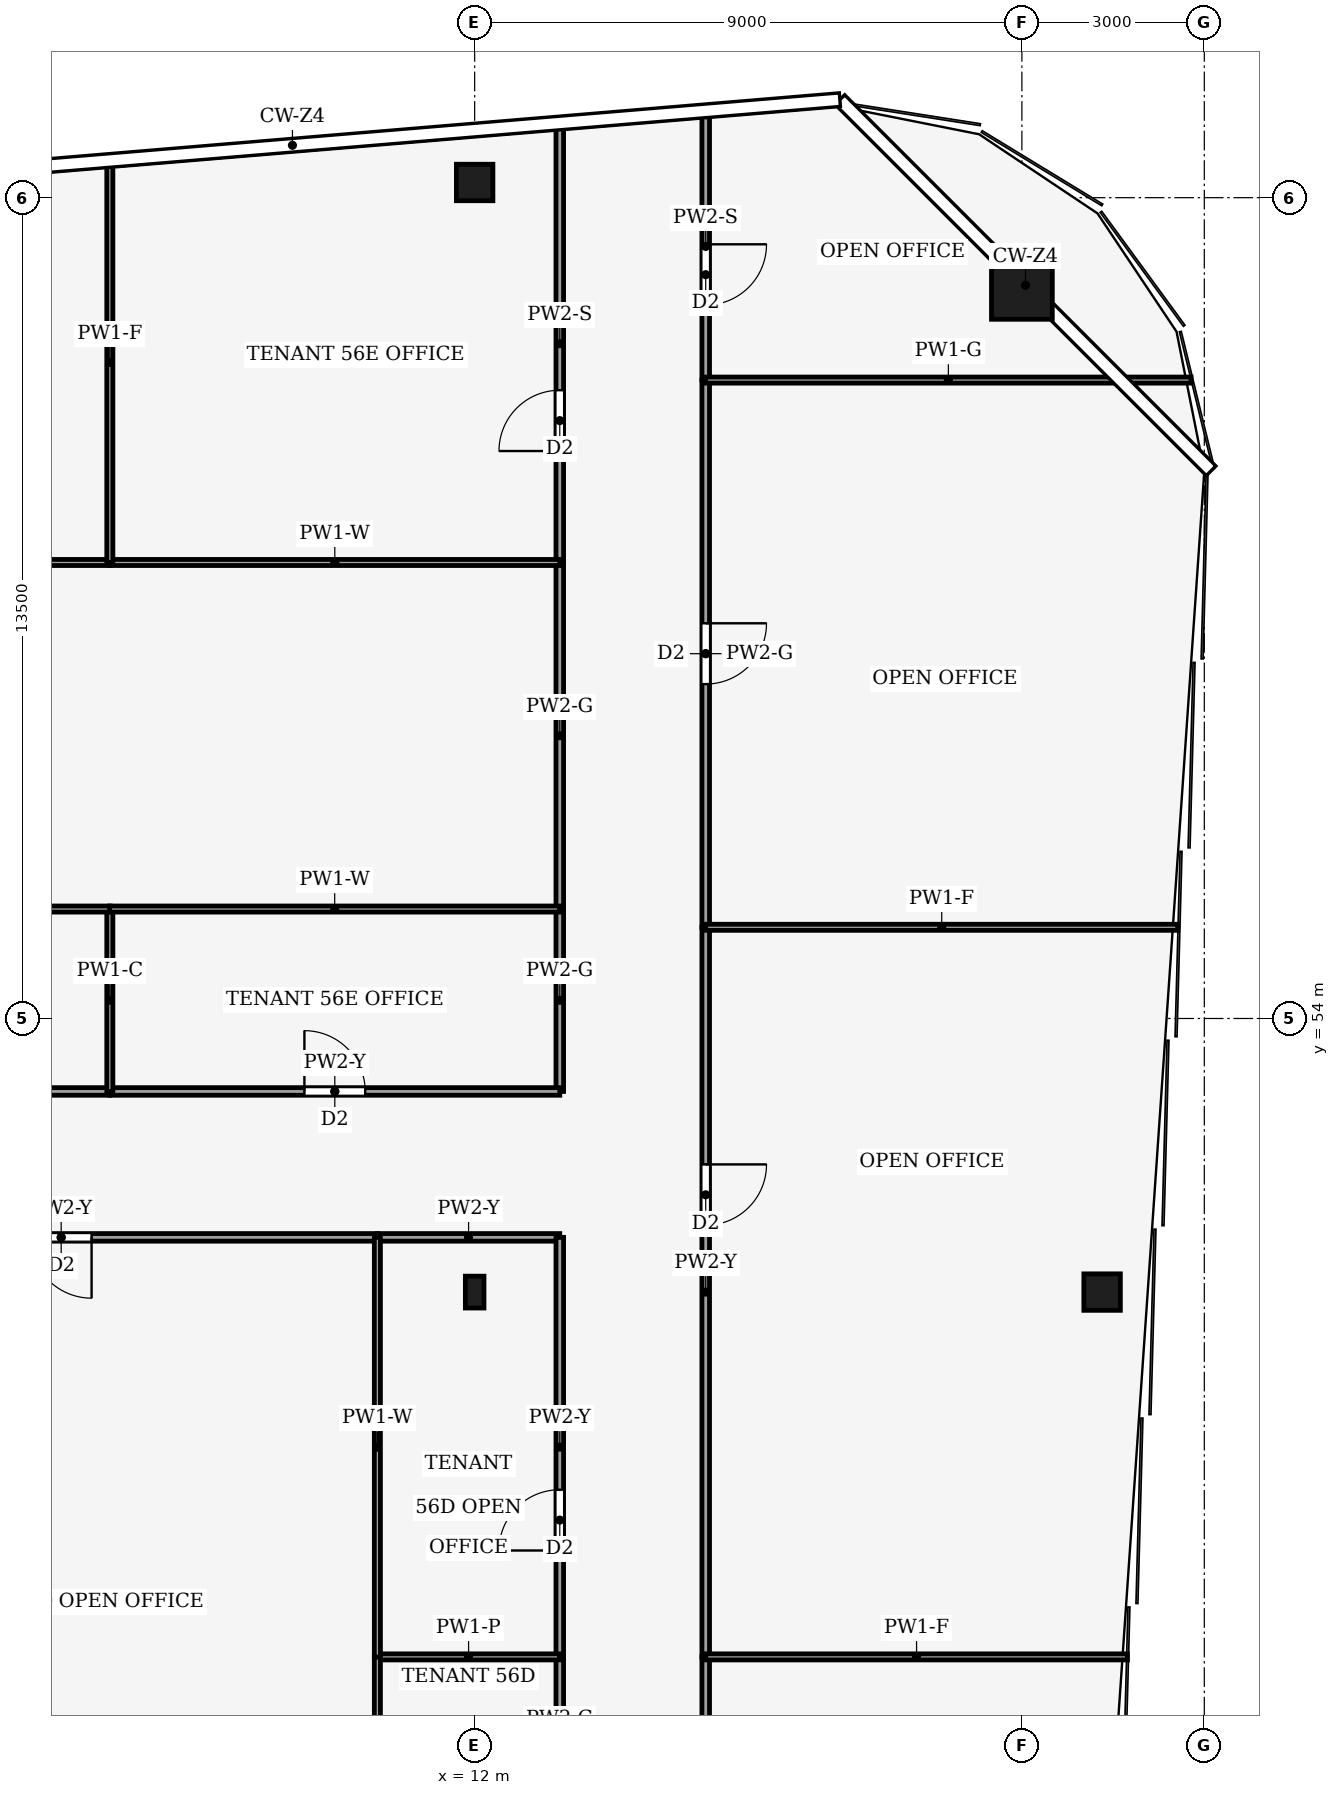
"""IFC4 building model, lengths in metres.
Left out: names, types, materials, properties, quantities, classifications, styles, units other than length and angle.
Written with IfcOpenShell. Run it as: python <this file> out.ifc"""

import sys

from ifc_helpers import new_model, si_unit, direction, frame, frame_2d, origin, origin_2d, place, context, subcontext, project, spatial, rectangle, hollow_rectangle, i_section, extrude, element, fill, save


model = new_model("IFC4")
c1 = context("Model", 3, precision=1e-05, world=origin(), true_north=direction((0.0, 1.0)))
c2 = subcontext(c1, "Body", "Model", "MODEL_VIEW")
j1 = project(units=[si_unit("LENGTHUNIT", "METRE"), si_unit("PLANEANGLEUNIT", "RADIAN")], contexts=[c1])
p1 = place(None, origin())
s1 = spatial("IfcSite", under=j1, at=p1, CompositionType="ELEMENT")
p2 = place(p1, origin())
s2 = spatial("IfcBuilding", under=s1, at=p2, CompositionType="ELEMENT")
p3 = place(p2, frame((0.0, 0.0, 246.0)))
s3 = spatial("IfcBuildingStorey", under=s2, at=p3, CompositionType="ELEMENT", Elevation=246.0)
p4 = place(p3, frame((21.0, 66.0, 0.0), z_axis=(0.0, 0.0, 1.0), x_axis=(1.0, 0.0, 0.0)))
e1 = element("IfcColumn", 1, at=p4, inside=s3, PredefinedType="COLUMN", context=c2, shape_type="SweptSolid", body=[
    extrude(hollow_rectangle(XDim=1.0, YDim=1.0, WallThickness=0.045, at=origin_2d()), origin(), (0.0, 0.0, 1.0), 4.0),
])
for number, where, z_axis, x_axis in (
    (2, (12.0, 67.75, 0.0), (0.0, 0.0, 1.0), (1.0, 0.0, 0.0)),
    (3, (22.319, 49.5, 0.0), (0.0, 0.0, 1.0), (1.0, 0.0, 0.0)),
):
    element("IfcColumn", number, at=place(p3, frame(where, z_axis=z_axis, x_axis=x_axis)), inside=s3, PredefinedType="COLUMN", context=c2, shape_type="SweptSolid", body=[
        extrude(hollow_rectangle(XDim=0.6, YDim=0.6, WallThickness=0.025, at=origin_2d()), origin(), (0.0, 0.0, 1.0), 4.0),
    ])
p5 = place(p3, frame((12.0, 49.5, 0.0), z_axis=(0.0, 0.0, 1.0), x_axis=(1.0, 0.0, 0.0)))
e4 = element("IfcColumn", 4, at=p5, inside=s3, PredefinedType="COLUMN", context=c2, shape_type="SweptSolid", body=[
    extrude(i_section(OverallWidth=0.306, OverallDepth=0.524, WebThickness=0.012, FlangeThickness=0.04, FilletRadius=0.027, at=origin_2d()), origin(), (0.0, 0.0, 1.0), 4.0),
])
p6 = place(p3, frame((15.8, 43.5, 0.0), z_axis=(0.0, 0.0, 1.0), x_axis=(0.0, -1.0, 0.0)))
e5 = element("IfcWall", 5, at=p6, inside=s3, PredefinedType="PARTITIONING", context=c2, shape_type="SweptSolid", body=[
    extrude(rectangle(XDim=9.0, YDim=0.125, at=frame_2d((4.5, 0.0))), origin(), (0.0, 0.0, 1.0), 3.14),
])
p7 = place(p6, frame((4.0, 0.0, 0.0)))
e6 = element("IfcOpeningElement", 6, at=p7, cuts=e5, PredefinedType="OPENING", context=c2, shape_type="SweptSolid", body=[
    extrude(rectangle(XDim=1.0, YDim=2.1, at=frame_2d((0.5, 1.05))), frame((0.0, 0.073, 0.0), z_axis=(0.0, -1.0, 0.0), x_axis=(1.0, 0.0, 0.0)), (0.0, 0.0, 1.0), 0.145),
])
p8 = place(p3, frame((15.8, 55.5, 0.0), z_axis=(0.0, 0.0, 1.0), x_axis=(0.0, -1.0, 0.0)))
e7 = element("IfcWall", 7, at=p8, inside=s3, PredefinedType="PARTITIONING", context=c2, shape_type="SweptSolid", body=[
    extrude(rectangle(XDim=12.0, YDim=0.125, at=frame_2d((6.0, 0.0))), origin(), (0.0, 0.0, 1.0), 3.24),
])
p9 = place(p8, frame((3.9, 0.0, 0.0)))
e8 = element("IfcOpeningElement", 8, at=p9, cuts=e7, PredefinedType="OPENING", context=c2, shape_type="SweptSolid", body=[
    extrude(rectangle(XDim=1.0, YDim=2.1, at=frame_2d((0.5, 1.05))), frame((0.0, 0.073, 0.0), z_axis=(0.0, -1.0, 0.0), x_axis=(1.0, 0.0, 0.0)), (0.0, 0.0, 1.0), 0.145),
])
p10 = place(p3, frame((15.8, 64.5, 0.0), z_axis=(0.0, 0.0, 1.0), x_axis=(0.0, -1.0, 0.0)))
e9 = element("IfcWall", 9, at=p10, inside=s3, PredefinedType="PARTITIONING", context=c2, shape_type="SweptSolid", body=[
    extrude(rectangle(XDim=9.0, YDim=0.125, at=frame_2d((4.5, 0.0))), origin(), (0.0, 0.0, 1.0), 3.87),
])
p11 = place(p10, frame((4.0, 0.0, 0.0)))
e10 = element("IfcOpeningElement", 10, at=p11, cuts=e9, PredefinedType="OPENING", context=c2, shape_type="SweptSolid", body=[
    extrude(rectangle(XDim=1.0, YDim=2.1, at=frame_2d((0.5, 1.05))), frame((0.0, 0.073, 0.0), z_axis=(0.0, -1.0, 0.0), x_axis=(1.0, 0.0, 0.0)), (0.0, 0.0, 1.0), 0.145),
])
p12 = place(p3, frame((15.8, 68.897, 0.0), z_axis=(0.0, 0.0, 1.0), x_axis=(0.0, -1.0, 0.0)))
e11 = element("IfcWall", 11, at=p12, inside=s3, PredefinedType="PARTITIONING", context=c2, shape_type="SweptSolid", body=[
    extrude(rectangle(XDim=4.397, YDim=0.125, at=frame_2d((2.198, 0.0))), origin(), (0.0, 0.0, 1.0), 3.04),
])
p13 = place(p12, frame((2.163, 0.0, 0.0)))
e12 = element("IfcOpeningElement", 12, at=p13, cuts=e11, PredefinedType="OPENING", context=c2, shape_type="SweptSolid", body=[
    extrude(rectangle(XDim=1.0, YDim=2.1, at=frame_2d((0.5, 1.05))), frame((0.0, 0.073, 0.0), z_axis=(0.0, -1.0, 0.0), x_axis=(1.0, 0.0, 0.0)), (0.0, 0.0, 1.0), 0.145),
])
p14 = place(p3, frame((13.4, 40.5, 0.0), z_axis=(0.0, 0.0, 1.0), x_axis=(0.0, 1.0, 0.0)))
e13 = element("IfcWall", 13, at=p14, inside=s3, PredefinedType="PARTITIONING", context=c2, shape_type="SweptSolid", body=[
    extrude(rectangle(XDim=3.0, YDim=0.125, at=frame_2d((1.5, 0.0))), origin(), (0.0, 0.0, 1.0), 3.87),
])
p15 = place(p3, frame((13.4, 50.4, 0.0), z_axis=(0.0, 0.0, 1.0), x_axis=(-1.0, 0.0, 0.0)))
e14 = element("IfcWall", 14, at=p15, inside=s3, PredefinedType="PARTITIONING", context=c2, shape_type="SweptSolid", body=[
    extrude(rectangle(XDim=3.0, YDim=0.125, at=frame_2d((1.5, 0.0))), origin(), (0.0, 0.0, 1.0), 3.24),
])
p16 = place(p3, frame((13.4, 43.5, 0.0), z_axis=(0.0, 0.0, 1.0), x_axis=(0.0, 1.0, 0.0)))
e15 = element("IfcWall", 15, at=p16, inside=s3, PredefinedType="PARTITIONING", context=c2, shape_type="SweptSolid", body=[
    extrude(rectangle(XDim=6.9, YDim=0.125, at=frame_2d((3.45, 0.0))), origin(), (0.0, 0.0, 1.0), 3.24),
])
p17 = place(p16, frame((1.75, 0.0, 0.0)))
e16 = element("IfcOpeningElement", 16, at=p17, cuts=e15, PredefinedType="OPENING", context=c2, shape_type="SweptSolid", body=[
    extrude(rectangle(XDim=1.0, YDim=2.1, at=frame_2d((0.5, 1.05))), frame((0.0, 0.073, 0.0), z_axis=(0.0, -1.0, 0.0), x_axis=(1.0, 0.0, 0.0)), (0.0, 0.0, 1.0), 0.145),
])
p18 = place(p3, frame((10.4, 50.4, 0.0), z_axis=(0.0, 0.0, 1.0), x_axis=(-1.0, 0.0, 0.0)))
e17 = element("IfcWall", 17, at=p18, inside=s3, PredefinedType="PARTITIONING", context=c2, shape_type="SweptSolid", body=[
    extrude(rectangle(XDim=10.4, YDim=0.125, at=frame_2d((5.2, 0.0))), origin(), (0.0, 0.0, 1.0), 3.24),
])
p19 = place(p18, frame((4.7, 0.0, 0.0)))
e18 = element("IfcOpeningElement", 18, at=p19, cuts=e17, PredefinedType="OPENING", context=c2, shape_type="SweptSolid", body=[
    extrude(rectangle(XDim=1.0, YDim=2.1, at=frame_2d((0.5, 1.05))), frame((0.0, 0.073, 0.0), z_axis=(0.0, -1.0, 0.0), x_axis=(1.0, 0.0, 0.0)), (0.0, 0.0, 1.0), 0.145),
])
p20 = place(p3, frame((-3.0, 52.8, 0.0), z_axis=(0.0, 0.0, 1.0), x_axis=(1.0, 0.0, 0.0)))
e19 = element("IfcWall", 19, at=p20, inside=s3, PredefinedType="PARTITIONING", context=c2, shape_type="SweptSolid", body=[
    extrude(rectangle(XDim=9.0, YDim=0.125, at=frame_2d((4.5, 0.0))), origin(), (0.0, 0.0, 1.0), 3.24),
])
p21 = place(p20, frame((4.8, 0.0, 0.0)))
e20 = element("IfcOpeningElement", 20, at=p21, cuts=e19, PredefinedType="OPENING", context=c2, shape_type="SweptSolid", body=[
    extrude(rectangle(XDim=1.0, YDim=2.1, at=frame_2d((0.5, 1.05))), frame((0.0, 0.073, 0.0), z_axis=(0.0, -1.0, 0.0), x_axis=(1.0, 0.0, 0.0)), (0.0, 0.0, 1.0), 0.145),
])
p22 = place(p3, frame((13.4, 52.8, 0.0), z_axis=(0.0, 0.0, 1.0), x_axis=(0.0, 1.0, 0.0)))
e21 = element("IfcWall", 21, at=p22, inside=s3, PredefinedType="PARTITIONING", context=c2, shape_type="SweptSolid", body=[
    extrude(rectangle(XDim=3.0, YDim=0.125, at=frame_2d((1.5, 0.0))), origin(), (0.0, 0.0, 1.0), 3.87),
])
p23 = place(p3, frame((6.0, 52.8, 0.0), z_axis=(0.0, 0.0, 1.0), x_axis=(1.0, 0.0, 0.0)))
e22 = element("IfcWall", 22, at=p23, inside=s3, PredefinedType="PARTITIONING", context=c2, shape_type="SweptSolid", body=[
    extrude(rectangle(XDim=7.4, YDim=0.125, at=frame_2d((3.7, 0.0))), origin(), (0.0, 0.0, 1.0), 3.24),
])
p24 = place(p23, frame((3.2, 0.0, 0.0)))
e23 = element("IfcOpeningElement", 23, at=p24, cuts=e22, PredefinedType="OPENING", context=c2, shape_type="SweptSolid", body=[
    extrude(rectangle(XDim=1.0, YDim=2.1, at=frame_2d((0.5, 1.05))), frame((0.0, 0.073, 0.0), z_axis=(0.0, -1.0, 0.0), x_axis=(1.0, 0.0, 0.0)), (0.0, 0.0, 1.0), 0.145),
])
p25 = place(p3, frame((13.4, 55.8, 0.0), z_axis=(0.0, 0.0, 1.0), x_axis=(0.0, 1.0, 0.0)))
e24 = element("IfcWall", 24, at=p25, inside=s3, PredefinedType="PARTITIONING", context=c2, shape_type="SweptSolid", body=[
    extrude(rectangle(XDim=5.7, YDim=0.125, at=frame_2d((2.85, 0.0))), origin(), (0.0, 0.0, 1.0), 3.87),
])
p26 = place(p3, frame((13.4, 61.5, 0.0), z_axis=(0.0, 0.0, 1.0), x_axis=(0.0, 1.0, 0.0)))
e25 = element("IfcWall", 25, at=p26, inside=s3, PredefinedType="PARTITIONING", context=c2, shape_type="SweptSolid", body=[
    extrude(rectangle(XDim=7.197, YDim=0.125, at=frame_2d((3.598, 0.0))), origin(), (0.0, 0.0, 1.0), 3.04),
])
p27 = place(p26, frame((1.833, 0.0, 0.0)))
e26 = element("IfcOpeningElement", 26, at=p27, cuts=e25, PredefinedType="OPENING", context=c2, shape_type="SweptSolid", body=[
    extrude(rectangle(XDim=1.0, YDim=2.1, at=frame_2d((0.5, 1.05))), frame((0.0, 0.073, 0.0), z_axis=(0.0, -1.0, 0.0), x_axis=(1.0, 0.0, 0.0)), (0.0, 0.0, 1.0), 0.145),
])
p28 = place(p3, frame((22.735, 43.5, 0.0), z_axis=(0.0, 0.0, 1.0), x_axis=(-1.0, 0.0, 0.0)))
e27 = element("IfcWall", 27, at=p28, inside=s3, PredefinedType="PARTITIONING", context=c2, shape_type="SweptSolid", body=[
    extrude(rectangle(XDim=6.935, YDim=0.1, at=frame_2d((3.468, 0.0))), origin(), (0.0, 0.0, 1.0), 3.04),
])
p29 = place(p3, frame((23.563, 55.5, 0.0), z_axis=(0.0, 0.0, 1.0), x_axis=(-1.0, 0.0, 0.0)))
e28 = element("IfcWall", 28, at=p29, inside=s3, PredefinedType="PARTITIONING", context=c2, shape_type="SweptSolid", body=[
    extrude(rectangle(XDim=7.763, YDim=0.1, at=frame_2d((3.881, 0.0))), origin(), (0.0, 0.0, 1.0), 3.04),
])
p30 = place(p3, frame((23.781, 64.5, 0.0), z_axis=(0.0, 0.0, 1.0), x_axis=(-1.0, 0.0, 0.0)))
e29 = element("IfcWall", 29, at=p30, inside=s3, PredefinedType="PARTITIONING", context=c2, shape_type="SweptSolid", body=[
    extrude(rectangle(XDim=7.981, YDim=0.1, at=frame_2d((3.991, 0.0))), origin(), (0.0, 0.0, 1.0), 2.93),
])
p31 = place(p3, frame((13.4, 43.5, 0.0), z_axis=(0.0, 0.0, 1.0), x_axis=(-1.0, 0.0, 0.0)))
e30 = element("IfcWall", 30, at=p31, inside=s3, PredefinedType="PARTITIONING", context=c2, shape_type="SweptSolid", body=[
    extrude(rectangle(XDim=3.0, YDim=0.1, at=frame_2d((1.5, 0.0))), origin(), (0.0, 0.0, 1.0), 3.44),
])
p32 = place(p3, frame((10.4, 43.504, 0.0), z_axis=(0.0, 0.0, 1.0), x_axis=(0.0, -1.0, 0.0)))
e31 = element("IfcWall", 31, at=p32, inside=s3, PredefinedType="PARTITIONING", context=c2, shape_type="SweptSolid", body=[
    extrude(rectangle(XDim=3.008, YDim=0.1, at=frame_2d((1.504, 0.0))), origin(), (0.0, 0.0, 1.0), 3.87),
])
p33 = place(p32, frame((1.004, 0.0, 0.0)))
e32 = element("IfcOpeningElement", 32, at=p33, cuts=e31, PredefinedType="OPENING", context=c2, shape_type="SweptSolid", body=[
    extrude(rectangle(XDim=1.0, YDim=2.1, at=frame_2d((0.5, 1.05))), frame((0.0, 0.06, 0.0), z_axis=(0.0, -1.0, 0.0), x_axis=(1.0, 0.0, 0.0)), (0.0, 0.0, 1.0), 0.12),
])
p34 = place(p3, frame((10.4, 50.4, 0.0), z_axis=(0.0, 0.0, 1.0), x_axis=(0.0, -1.0, 0.0)))
e33 = element("IfcWall", 33, at=p34, inside=s3, PredefinedType="PARTITIONING", context=c2, shape_type="SweptSolid", body=[
    extrude(rectangle(XDim=6.904, YDim=0.1, at=frame_2d((3.452, 0.0))), origin(), (0.0, 0.0, 1.0), 3.24),
])
p35 = place(p3, frame((6.0, 52.8, 0.0), z_axis=(0.0, 0.0, 1.0), x_axis=(0.0, 1.0, 0.0)))
e34 = element("IfcWall", 34, at=p35, inside=s3, PredefinedType="PARTITIONING", context=c2, shape_type="SweptSolid", body=[
    extrude(rectangle(XDim=3.0, YDim=0.1, at=frame_2d((1.5, 0.0))), origin(), (0.0, 0.0, 1.0), 3.87),
])
p36 = place(p3, frame((6.004, 55.8, 0.0), z_axis=(0.0, 0.0, 1.0), x_axis=(-1.0, 0.0, 0.0)))
e35 = element("IfcWall", 35, at=p36, inside=s3, PredefinedType="PARTITIONING", context=c2, shape_type="SweptSolid", body=[
    extrude(rectangle(XDim=9.008, YDim=0.1, at=frame_2d((4.504, 0.0))), origin(), (0.0, 0.0, 1.0), 3.24),
])
p37 = place(p3, frame((13.4, 55.8, 0.0), z_axis=(0.0, 0.0, 1.0), x_axis=(-1.0, 0.0, 0.0)))
e36 = element("IfcWall", 36, at=p37, inside=s3, PredefinedType="PARTITIONING", context=c2, shape_type="SweptSolid", body=[
    extrude(rectangle(XDim=7.404, YDim=0.1, at=frame_2d((3.702, 0.0))), origin(), (0.0, 0.0, 1.0), 3.24),
])
p38 = place(p3, frame((0.0, 61.5, 0.0), z_axis=(0.0, 0.0, 1.0), x_axis=(1.0, 0.0, 0.0)))
e37 = element("IfcWall", 37, at=p38, inside=s3, PredefinedType="PARTITIONING", context=c2, shape_type="SweptSolid", body=[
    extrude(rectangle(XDim=6.0, YDim=0.1, at=frame_2d((3.0, 0.0))), origin(), (0.0, 0.0, 1.0), 3.24),
])
p39 = place(p38, frame((2.5, 0.0, 0.0)))
e38 = element("IfcOpeningElement", 38, at=p39, cuts=e37, PredefinedType="OPENING", context=c2, shape_type="SweptSolid", body=[
    extrude(rectangle(XDim=1.0, YDim=2.1, at=frame_2d((0.5, 1.05))), frame((0.0, 0.06, 0.0), z_axis=(0.0, -1.0, 0.0), x_axis=(1.0, 0.0, 0.0)), (0.0, 0.0, 1.0), 0.12),
])
p40 = place(p3, frame((13.4, 61.5, 0.0), z_axis=(0.0, 0.0, 1.0), x_axis=(-1.0, 0.0, 0.0)))
e39 = element("IfcWall", 39, at=p40, inside=s3, PredefinedType="PARTITIONING", context=c2, shape_type="SweptSolid", body=[
    extrude(rectangle(XDim=7.4, YDim=0.1, at=frame_2d((3.7, 0.0))), origin(), (0.0, 0.0, 1.0), 3.24),
])
p41 = place(p3, frame((6.0, 61.5, 0.0), z_axis=(0.0, 0.0, 1.0), x_axis=(0.0, 1.0, 0.0)))
e40 = element("IfcWall", 40, at=p41, inside=s3, PredefinedType="PARTITIONING", context=c2, shape_type="SweptSolid", body=[
    extrude(rectangle(XDim=6.58, YDim=0.1, at=frame_2d((3.29, 0.0))), origin(), (0.0, 0.0, 1.0), 3.04),
])
p42 = place(p9, origin())
e41 = element("IfcDoor", 41, at=p42, inside=s3, OperationType="SINGLE_SWING_LEFT", PredefinedType="DOOR", context=c2, shape_type="SweptSolid", body=[
    extrude(rectangle(XDim=1.0, YDim=2.1, at=frame_2d((0.5, 1.05))), frame((0.0, 0.025, 0.0), z_axis=(0.0, -1.0, 0.0), x_axis=(1.0, 0.0, 0.0)), (0.0, 0.0, 1.0), 0.05),
])
fill(e8, e41)
p43 = place(p11, origin())
e42 = element("IfcDoor", 42, at=p43, inside=s3, OperationType="SINGLE_SWING_LEFT", PredefinedType="DOOR", context=c2, shape_type="SweptSolid", body=[
    extrude(rectangle(XDim=1.0, YDim=2.1, at=frame_2d((0.5, 1.05))), frame((0.0, 0.025, 0.0), z_axis=(0.0, -1.0, 0.0), x_axis=(1.0, 0.0, 0.0)), (0.0, 0.0, 1.0), 0.05),
])
fill(e10, e42)
p44 = place(p13, origin())
e43 = element("IfcDoor", 43, at=p44, inside=s3, OperationType="SINGLE_SWING_RIGHT", PredefinedType="DOOR", context=c2, shape_type="SweptSolid", body=[
    extrude(rectangle(XDim=1.0, YDim=2.1, at=frame_2d((0.5, 1.05))), frame((0.0, 0.025, 0.0), z_axis=(0.0, -1.0, 0.0), x_axis=(1.0, 0.0, 0.0)), (0.0, 0.0, 1.0), 0.05),
])
fill(e12, e43)
p45 = place(p17, origin())
e44 = element("IfcDoor", 44, at=p45, inside=s3, OperationType="SINGLE_SWING_LEFT", PredefinedType="DOOR", context=c2, shape_type="SweptSolid", body=[
    extrude(rectangle(XDim=1.0, YDim=2.1, at=frame_2d((0.5, 1.05))), frame((0.0, 0.025, 0.0), z_axis=(0.0, -1.0, 0.0), x_axis=(1.0, 0.0, 0.0)), (0.0, 0.0, 1.0), 0.05),
])
fill(e16, e44)
p46 = place(p19, origin())
e45 = element("IfcDoor", 45, at=p46, inside=s3, OperationType="SINGLE_SWING_RIGHT", PredefinedType="DOOR", context=c2, shape_type="SweptSolid", body=[
    extrude(rectangle(XDim=1.0, YDim=2.1, at=frame_2d((0.5, 1.05))), frame((0.0, 0.025, 0.0), z_axis=(0.0, -1.0, 0.0), x_axis=(1.0, 0.0, 0.0)), (0.0, 0.0, 1.0), 0.05),
])
fill(e18, e45)
p47 = place(p24, origin())
e46 = element("IfcDoor", 46, at=p47, inside=s3, OperationType="SINGLE_SWING_LEFT", PredefinedType="DOOR", context=c2, shape_type="SweptSolid", body=[
    extrude(rectangle(XDim=1.0, YDim=2.1, at=frame_2d((0.5, 1.05))), frame((0.0, 0.025, 0.0), z_axis=(0.0, -1.0, 0.0), x_axis=(1.0, 0.0, 0.0)), (0.0, 0.0, 1.0), 0.05),
])
fill(e23, e46)
p48 = place(p27, origin())
e47 = element("IfcDoor", 47, at=p48, inside=s3, OperationType="SINGLE_SWING_LEFT", PredefinedType="DOOR", context=c2, shape_type="SweptSolid", body=[
    extrude(rectangle(XDim=1.0, YDim=2.1, at=frame_2d((0.5, 1.05))), frame((0.0, 0.025, 0.0), z_axis=(0.0, -1.0, 0.0), x_axis=(1.0, 0.0, 0.0)), (0.0, 0.0, 1.0), 0.05),
])
fill(e26, e47)
save(model, sys.argv[1])
